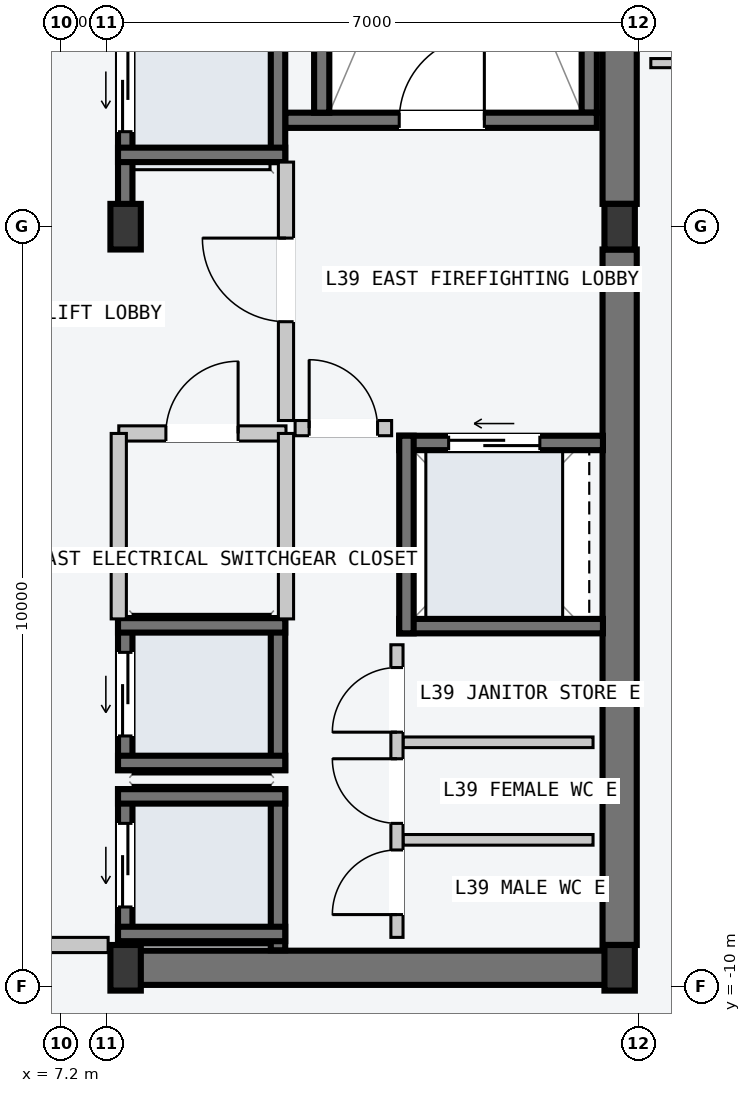
"""IFC4 building model, lengths in metres.
Left out: names, types, materials, properties, quantities, classifications, styles, units other than length and angle.
Written with IfcOpenShell. Run it as: python <this file> out.ifc"""

import sys

from ifc_helpers import new_model, si_unit, direction, frame, frame_2d, origin, origin_2d, place, context, subcontext, project, spatial, rectangle, i_section, extrude, element, fill, save


model = new_model("IFC4")
c1 = context("Model", 3, precision=1e-05, world=origin(), true_north=direction((0.0, 1.0)))
c2 = subcontext(c1, "Body", "Model", "MODEL_VIEW")
j1 = project(units=[si_unit("LENGTHUNIT", "METRE"), si_unit("PLANEANGLEUNIT", "RADIAN")], contexts=[c1])
p1 = place(None, origin())
s1 = spatial("IfcSite", under=j1, at=p1, CompositionType="ELEMENT")
p2 = place(p1, origin())
s2 = spatial("IfcBuilding", under=s1, at=p2, CompositionType="ELEMENT")
p3 = place(p2, frame((0.0, 0.0, 150.6)))
s3 = spatial("IfcBuildingStorey", under=s2, at=p3, CompositionType="ELEMENT", Elevation=150.6)
p4 = place(p3, frame((8.07, -9.75, -0.2), z_axis=(0.0, 0.0, 1.0), x_axis=(1.0, 0.0, 0.0)))
e1 = element("IfcWall", 1, at=p4, inside=s3, PredefinedType="SHEAR", context=c2, shape_type="SweptSolid", body=[
    extrude(rectangle(XDim=6.46, YDim=0.45, at=frame_2d((3.23, 0.0))), origin(), (0.0, 0.0, 1.0), 4.5),
])
for number, where, z_axis, x_axis in (
    (2, (14.55, -9.45, -0.2), (0.0, 0.0, 1.0), (0.0, 1.0, 0.0)),
    (3, (14.55, 0.3, -0.2), (0.0, 0.0, 1.0), (0.0, 1.0, 0.0)),
):
    element("IfcWall", number, at=place(p3, frame(where, z_axis=z_axis, x_axis=x_axis)), inside=s3, PredefinedType="SHEAR", context=c2, shape_type="SweptSolid", body=[
        extrude(rectangle(XDim=9.15, YDim=0.45, at=frame_2d((4.575, 0.0))), origin(), (0.0, 0.0, 1.0), 4.5),
    ])
p5 = place(p3, frame((14.15, 1.5, -0.2), z_axis=(0.0, 0.0, 1.0), x_axis=(0.0, 1.0, 0.0)))
e4 = element("IfcWall", 4, at=p5, inside=s3, PredefinedType="SOLIDWALL", context=c2, shape_type="SweptSolid", body=[
    extrude(rectangle(XDim=7.8, YDim=0.2, at=frame_2d((3.9, 0.0))), origin(), (0.0, 0.0, 1.0), 4.5),
])
p6 = place(p3, frame((10.15, 1.4, -0.2), z_axis=(0.0, 0.0, 1.0), x_axis=(1.0, 0.0, 0.0)))
e5 = element("IfcWall", 5, at=p6, inside=s3, PredefinedType="SOLIDWALL", context=c2, shape_type="SweptSolid", body=[
    extrude(rectangle(XDim=4.1, YDim=0.2, at=frame_2d((2.05, 0.0))), origin(), (0.0, 0.0, 1.0), 4.5),
])
p7 = place(p6, frame((1.5, 0.0, 0.2)))
e6 = element("IfcOpeningElement", 6, at=p7, cuts=e5, PredefinedType="OPENING", context=c2, shape_type="SweptSolid", body=[
    extrude(rectangle(XDim=1.12, YDim=2.18, at=frame_2d((0.56, 1.09))), frame((0.0, 0.11, 0.0), z_axis=(0.0, -1.0, 0.0), x_axis=(1.0, 0.0, 0.0)), (0.0, 0.0, 1.0), 0.22),
])
p8 = place(p3, frame((10.63, 1.5, -0.2), z_axis=(0.0, 0.0, 1.0), x_axis=(0.0, 1.0, 0.0)))
e7 = element("IfcWall", 7, at=p8, inside=s3, PredefinedType="SOLIDWALL", context=c2, shape_type="SweptSolid", body=[
    extrude(rectangle(XDim=7.8, YDim=0.2, at=frame_2d((3.9, 0.0))), origin(), (0.0, 0.0, 1.0), 4.5),
])
for number, where, z_axis, x_axis in (
    (8, (8.05, -9.75, 0.0), (0.0, 0.0, 1.0), (1.0, 0.0, 0.0)),
    (9, (8.05, 0.0, 0.0), (0.0, 0.0, 1.0), (1.0, 0.0, 0.0)),
    (10, (14.55, -9.75, 0.0), (0.0, 0.0, 1.0), (1.0, 0.0, 0.0)),
    (11, (14.55, 0.0, 0.0), (0.0, 0.0, 1.0), (1.0, 0.0, 0.0)),
):
    element("IfcColumn", number, at=place(p3, frame(where, z_axis=z_axis, x_axis=x_axis)), inside=s3, PredefinedType="COLUMN", context=c2, shape_type="SweptSolid", body=[
        extrude(i_section(OverallWidth=0.4, OverallDepth=0.6, WebThickness=0.022, FlangeThickness=0.036, at=origin_2d()), origin(), (0.0, 0.0, 1.0), 4.5),
    ])
p9 = place(p3, frame((8.045, 0.21, -0.2), z_axis=(0.0, 0.0, 1.0), x_axis=(0.0, 1.0, 0.0)))
e12 = element("IfcWall", 12, at=p9, inside=s3, PredefinedType="SOLIDWALL", context=c2, shape_type="SweptSolid", body=[
    extrude(rectangle(XDim=2.54, YDim=0.19, at=frame_2d((1.27, 0.0))), origin(), (0.0, 0.0, 1.0), 4.5),
])
p10 = place(p9, frame((1.04, 0.0, 0.2)))
e13 = element("IfcOpeningElement", 13, at=p10, cuts=e12, PredefinedType="OPENING", context=c2, shape_type="SweptSolid", body=[
    extrude(rectangle(XDim=1.1, YDim=2.2, at=frame_2d((0.55, 1.1))), frame((0.0, 0.105, 0.0), z_axis=(0.0, -1.0, 0.0), x_axis=(1.0, 0.0, 0.0)), (0.0, 0.0, 1.0), 0.21),
])
p11 = place(p3, frame((10.055, 0.85, -0.2), z_axis=(0.0, 0.0, 1.0), x_axis=(0.0, 1.0, 0.0)))
e14 = element("IfcWall", 14, at=p11, inside=s3, PredefinedType="SOLIDWALL", context=c2, shape_type="SweptSolid", body=[
    extrude(rectangle(XDim=1.9, YDim=0.19, at=frame_2d((0.95, 0.0))), origin(), (0.0, 0.0, 1.0), 4.5),
])
p12 = place(p3, frame((7.95, 0.945, -0.2), z_axis=(0.0, 0.0, 1.0), x_axis=(1.0, 0.0, 0.0)))
e15 = element("IfcWall", 15, at=p12, inside=s3, PredefinedType="SOLIDWALL", context=c2, shape_type="SweptSolid", body=[
    extrude(rectangle(XDim=2.2, YDim=0.19, at=frame_2d((1.1, 0.0))), origin(), (0.0, 0.0, 1.0), 4.5),
])
p13 = place(p3, frame((8.045, -9.52, -0.2), z_axis=(0.0, 0.0, 1.0), x_axis=(0.0, 1.0, 0.0)))
e16 = element("IfcWall", 16, at=p13, inside=s3, PredefinedType="SOLIDWALL", context=c2, shape_type="SweptSolid", body=[
    extrude(rectangle(XDim=2.12, YDim=0.19, at=frame_2d((1.06, 0.0))), origin(), (0.0, 0.0, 1.0), 4.5),
])
p14 = place(p13, frame((0.57, 0.0, 0.2)))
e17 = element("IfcOpeningElement", 17, at=p14, cuts=e16, PredefinedType="OPENING", context=c2, shape_type="SweptSolid", body=[
    extrude(rectangle(XDim=1.1, YDim=2.2, at=frame_2d((0.55, 1.1))), frame((0.0, 0.105, 0.0), z_axis=(0.0, -1.0, 0.0), x_axis=(1.0, 0.0, 0.0)), (0.0, 0.0, 1.0), 0.21),
])
p15 = place(p3, frame((10.055, -9.52, -0.2), z_axis=(0.0, 0.0, 1.0), x_axis=(0.0, 1.0, 0.0)))
e18 = element("IfcWall", 18, at=p15, inside=s3, PredefinedType="SOLIDWALL", context=c2, shape_type="SweptSolid", body=[
    extrude(rectangle(XDim=2.12, YDim=0.19, at=frame_2d((1.06, 0.0))), origin(), (0.0, 0.0, 1.0), 4.5),
])
for number, where, z_axis, x_axis in (
    (19, (7.95, -7.495, -0.2), (0.0, 0.0, 1.0), (1.0, 0.0, 0.0)),
    (20, (7.95, -9.305, -0.2), (0.0, 0.0, 1.0), (1.0, 0.0, 0.0)),
):
    element("IfcWall", number, at=place(p3, frame(where, z_axis=z_axis, x_axis=x_axis)), inside=s3, PredefinedType="SOLIDWALL", context=c2, shape_type="SweptSolid", body=[
        extrude(rectangle(XDim=2.2, YDim=0.19, at=frame_2d((1.1, 0.0))), origin(), (0.0, 0.0, 1.0), 4.5),
    ])
p16 = place(p3, frame((8.045, -7.15, -0.2), z_axis=(0.0, 0.0, 1.0), x_axis=(0.0, 1.0, 0.0)))
e21 = element("IfcWall", 21, at=p16, inside=s3, PredefinedType="SOLIDWALL", context=c2, shape_type="SweptSolid", body=[
    extrude(rectangle(XDim=2.0, YDim=0.19, at=frame_2d((1.0, 0.0))), origin(), (0.0, 0.0, 1.0), 4.5),
])
p17 = place(p16, frame((0.45, 0.0, 0.2)))
e22 = element("IfcOpeningElement", 22, at=p17, cuts=e21, PredefinedType="OPENING", context=c2, shape_type="SweptSolid", body=[
    extrude(rectangle(XDim=1.1, YDim=2.2, at=frame_2d((0.55, 1.1))), frame((0.0, 0.105, 0.0), z_axis=(0.0, -1.0, 0.0), x_axis=(1.0, 0.0, 0.0)), (0.0, 0.0, 1.0), 0.21),
])
p18 = place(p3, frame((10.055, -7.15, -0.2), z_axis=(0.0, 0.0, 1.0), x_axis=(0.0, 1.0, 0.0)))
e23 = element("IfcWall", 23, at=p18, inside=s3, PredefinedType="SOLIDWALL", context=c2, shape_type="SweptSolid", body=[
    extrude(rectangle(XDim=2.0, YDim=0.19, at=frame_2d((1.0, 0.0))), origin(), (0.0, 0.0, 1.0), 4.5),
])
for number, where, z_axis, x_axis in (
    (24, (7.95, -5.245, -0.2), (0.0, 0.0, 1.0), (1.0, 0.0, 0.0)),
    (25, (7.95, -7.055, -0.2), (0.0, 0.0, 1.0), (1.0, 0.0, 0.0)),
):
    element("IfcWall", number, at=place(p3, frame(where, z_axis=z_axis, x_axis=x_axis)), inside=s3, PredefinedType="SOLIDWALL", context=c2, shape_type="SweptSolid", body=[
        extrude(rectangle(XDim=2.2, YDim=0.19, at=frame_2d((1.1, 0.0))), origin(), (0.0, 0.0, 1.0), 4.5),
    ])
p19 = place(p3, frame((11.65, -2.845, -0.2), z_axis=(0.0, 0.0, 1.0), x_axis=(1.0, 0.0, 0.0)))
e26 = element("IfcWall", 26, at=p19, inside=s3, PredefinedType="SOLIDWALL", context=c2, shape_type="SweptSolid", body=[
    extrude(rectangle(XDim=2.68, YDim=0.19, at=frame_2d((1.34, 0.0))), origin(), (0.0, 0.0, 1.0), 4.5),
])
p20 = place(p19, frame((0.65, 0.0, 0.2)))
e27 = element("IfcOpeningElement", 27, at=p20, cuts=e26, PredefinedType="OPENING", context=c2, shape_type="SweptSolid", body=[
    extrude(rectangle(XDim=1.2, YDim=2.2, at=frame_2d((0.6, 1.1))), frame((0.0, 0.105, 0.0), z_axis=(0.0, -1.0, 0.0), x_axis=(1.0, 0.0, 0.0)), (0.0, 0.0, 1.0), 0.21),
])
p21 = place(p3, frame((11.65, -5.255, -0.2), z_axis=(0.0, 0.0, 1.0), x_axis=(1.0, 0.0, 0.0)))
e28 = element("IfcWall", 28, at=p21, inside=s3, PredefinedType="SOLIDWALL", context=c2, shape_type="SweptSolid", body=[
    extrude(rectangle(XDim=2.68, YDim=0.19, at=frame_2d((1.34, 0.0))), origin(), (0.0, 0.0, 1.0), 4.5),
])
p22 = place(p3, frame((11.745, -5.35, -0.2), z_axis=(0.0, 0.0, 1.0), x_axis=(0.0, 1.0, 0.0)))
e29 = element("IfcWall", 29, at=p22, inside=s3, PredefinedType="SOLIDWALL", context=c2, shape_type="SweptSolid", body=[
    extrude(rectangle(XDim=2.6, YDim=0.19, at=frame_2d((1.3, 0.0))), origin(), (0.0, 0.0, 1.0), 4.5),
])
p23 = place(p3, frame((6.02, -9.45, 0.0), z_axis=(0.0, 0.0, 1.0), x_axis=(1.0, 0.0, 0.0)))
e30 = element("IfcWall", 30, at=p23, inside=s3, PredefinedType="PARTITIONING", context=c2, shape_type="SweptSolid", body=[
    extrude(rectangle(XDim=1.8, YDim=0.2, at=frame_2d((0.9, 0.0))), origin(), (0.0, 0.0, 1.0), 4.3),
])
p24 = place(p3, frame((10.16, -2.55, 0.0), z_axis=(0.0, 0.0, 1.0), x_axis=(0.0, 1.0, 0.0)))
e31 = element("IfcWall", 31, at=p24, inside=s3, PredefinedType="PARTITIONING", context=c2, shape_type="SweptSolid", body=[
    extrude(rectangle(XDim=3.4, YDim=0.2, at=frame_2d((1.7, 0.0))), origin(), (0.0, 0.0, 1.0), 4.3),
])
p25 = place(p24, frame((1.3, 0.0, 0.0)))
e32 = element("IfcOpeningElement", 32, at=p25, cuts=e31, PredefinedType="OPENING", context=c2, shape_type="SweptSolid", body=[
    extrude(rectangle(XDim=1.1, YDim=2.15, at=frame_2d((0.55, 1.075))), frame((0.0, 0.11, 0.0), z_axis=(0.0, -1.0, 0.0), x_axis=(1.0, 0.0, 0.0)), (0.0, 0.0, 1.0), 0.22),
])
p26 = place(p3, frame((10.28, -2.65, 0.0), z_axis=(0.0, 0.0, 1.0), x_axis=(1.0, 0.0, 0.0)))
e33 = element("IfcWall", 33, at=p26, inside=s3, PredefinedType="PARTITIONING", context=c2, shape_type="SweptSolid", body=[
    extrude(rectangle(XDim=1.27, YDim=0.2, at=frame_2d((0.635, 0.0))), origin(), (0.0, 0.0, 1.0), 4.3),
])
p27 = place(p26, frame((0.185, 0.0, 0.0)))
e34 = element("IfcOpeningElement", 34, at=p27, cuts=e33, PredefinedType="OPENING", context=c2, shape_type="SweptSolid", body=[
    extrude(rectangle(XDim=0.9, YDim=2.15, at=frame_2d((0.45, 1.075))), frame((0.0, 0.11, 0.0), z_axis=(0.0, -1.0, 0.0), x_axis=(1.0, 0.0, 0.0)), (0.0, 0.0, 1.0), 0.22),
])
p28 = place(p3, frame((7.96, -2.72, 0.0), z_axis=(0.0, 0.0, 1.0), x_axis=(1.0, 0.0, 0.0)))
e35 = element("IfcWall", 35, at=p28, inside=s3, PredefinedType="PARTITIONING", context=c2, shape_type="SweptSolid", body=[
    extrude(rectangle(XDim=2.2, YDim=0.2, at=frame_2d((1.1, 0.0))), origin(), (0.0, 0.0, 1.0), 4.3),
])
p29 = place(p28, frame((0.62, 0.0, 0.0)))
e36 = element("IfcOpeningElement", 36, at=p29, cuts=e35, PredefinedType="OPENING", context=c2, shape_type="SweptSolid", body=[
    extrude(rectangle(XDim=0.95, YDim=2.1, at=frame_2d((0.475, 1.05))), frame((0.0, 0.11, 0.0), z_axis=(0.0, -1.0, 0.0), x_axis=(1.0, 0.0, 0.0)), (0.0, 0.0, 1.0), 0.22),
])
for number, where, z_axis, x_axis in (
    (37, (7.96, -5.16, 0.0), (0.0, 0.0, 1.0), (0.0, 1.0, 0.0)),
    (38, (10.16, -5.16, 0.0), (0.0, 0.0, 1.0), (0.0, 1.0, 0.0)),
):
    element("IfcWall", number, at=place(p3, frame(where, z_axis=z_axis, x_axis=x_axis)), inside=s3, PredefinedType="PARTITIONING", context=c2, shape_type="SweptSolid", body=[
        extrude(rectangle(XDim=2.44, YDim=0.2, at=frame_2d((1.22, 0.0))), origin(), (0.0, 0.0, 1.0), 4.3),
    ])
for number, where, z_axis, x_axis in (
    (39, (11.7, -8.067, 0.0), (0.0, 0.0, 1.0), (1.0, 0.0, 0.0)),
    (40, (11.7, -6.783, 0.0), (0.0, 0.0, 1.0), (1.0, 0.0, 0.0)),
):
    element("IfcWall", number, at=place(p3, frame(where, z_axis=z_axis, x_axis=x_axis)), inside=s3, PredefinedType="PARTITIONING", context=c2, shape_type="SweptSolid", body=[
        extrude(rectangle(XDim=2.5, YDim=0.14, at=frame_2d((1.25, 0.0))), origin(), (0.0, 0.0, 1.0), 4.3),
    ])
p30 = place(p3, frame((11.62, -9.35, 0.0), z_axis=(0.0, 0.0, 1.0), x_axis=(0.0, 1.0, 0.0)))
e41 = element("IfcWall", 41, at=p30, inside=s3, PredefinedType="PARTITIONING", context=c2, shape_type="SweptSolid", body=[
    extrude(rectangle(XDim=3.85, YDim=0.16, at=frame_2d((1.925, 0.0))), origin(), (0.0, 0.0, 1.0), 4.3),
])
p31 = place(p30, frame((0.3, 0.0, 0.0)))
e42 = element("IfcOpeningElement", 42, at=p31, cuts=e41, PredefinedType="OPENING", context=c2, shape_type="SweptSolid", body=[
    extrude(rectangle(XDim=0.85, YDim=2.12, at=frame_2d((0.425, 1.06))), frame((0.0, 0.09, 0.0), z_axis=(0.0, -1.0, 0.0), x_axis=(1.0, 0.0, 0.0)), (0.0, 0.0, 1.0), 0.18),
])
p32 = place(p30, frame((1.5, 0.0, 0.0)))
e43 = element("IfcOpeningElement", 43, at=p32, cuts=e41, PredefinedType="OPENING", context=c2, shape_type="SweptSolid", body=[
    extrude(rectangle(XDim=0.85, YDim=2.12, at=frame_2d((0.425, 1.06))), frame((0.0, 0.09, 0.0), z_axis=(0.0, -1.0, 0.0), x_axis=(1.0, 0.0, 0.0)), (0.0, 0.0, 1.0), 0.18),
])
p33 = place(p30, frame((2.7, 0.0, 0.0)))
e44 = element("IfcOpeningElement", 44, at=p33, cuts=e41, PredefinedType="OPENING", context=c2, shape_type="SweptSolid", body=[
    extrude(rectangle(XDim=0.85, YDim=2.12, at=frame_2d((0.425, 1.06))), frame((0.0, 0.09, 0.0), z_axis=(0.0, -1.0, 0.0), x_axis=(1.0, 0.0, 0.0)), (0.0, 0.0, 1.0), 0.18),
])
p34 = place(p3, frame((14.96, 2.152, 0.0), z_axis=(0.0, 0.0, 1.0), x_axis=(1.0, 0.0, 0.0)))
e45 = element("IfcWall", 45, at=p34, inside=s3, PredefinedType="PARTITIONING", context=c2, shape_type="SweptSolid", body=[
    extrude(rectangle(XDim=5.6, YDim=0.12, at=frame_2d((2.8, 0.0))), origin(), (0.0, 0.0, 1.0), 4.3),
])
p35 = place(p34, frame((0.9, 0.0, 0.0)))
e46 = element("IfcOpeningElement", 46, at=p35, cuts=e45, PredefinedType="OPENING", context=c2, shape_type="SweptSolid", body=[
    extrude(rectangle(XDim=0.96, YDim=2.18, at=frame_2d((0.48, 1.09))), frame((0.0, 0.07, 0.0), z_axis=(0.0, -1.0, 0.0), x_axis=(1.0, 0.0, 0.0)), (0.0, 0.0, 1.0), 0.14),
])
p36 = place(p7, origin())
e47 = element("IfcDoor", 47, at=p36, inside=s3, OperationType="SINGLE_SWING_RIGHT", PredefinedType="DOOR", context=c2, shape_type="SweptSolid", body=[
    extrude(rectangle(XDim=1.12, YDim=2.18, at=frame_2d((0.56, 1.09))), frame((0.0, 0.025, 0.0), z_axis=(0.0, -1.0, 0.0), x_axis=(1.0, 0.0, 0.0)), (0.0, 0.0, 1.0), 0.05),
])
fill(e6, e47)
p37 = place(p10, origin())
e48 = element("IfcDoor", 48, at=p37, inside=s3, OperationType="SLIDING_TO_LEFT", PredefinedType="DOOR", context=c2, shape_type="SweptSolid", body=[
    extrude(rectangle(XDim=1.1, YDim=2.2, at=frame_2d((0.55, 1.1))), frame((0.0, 0.025, 0.0), z_axis=(0.0, -1.0, 0.0), x_axis=(1.0, 0.0, 0.0)), (0.0, 0.0, 1.0), 0.05),
])
fill(e13, e48)
p38 = place(p14, origin())
e49 = element("IfcDoor", 49, at=p38, inside=s3, OperationType="SLIDING_TO_LEFT", PredefinedType="DOOR", context=c2, shape_type="SweptSolid", body=[
    extrude(rectangle(XDim=1.1, YDim=2.2, at=frame_2d((0.55, 1.1))), frame((0.0, 0.025, 0.0), z_axis=(0.0, -1.0, 0.0), x_axis=(1.0, 0.0, 0.0)), (0.0, 0.0, 1.0), 0.05),
])
fill(e17, e49)
p39 = place(p17, origin())
e50 = element("IfcDoor", 50, at=p39, inside=s3, OperationType="SLIDING_TO_LEFT", PredefinedType="DOOR", context=c2, shape_type="SweptSolid", body=[
    extrude(rectangle(XDim=1.1, YDim=2.2, at=frame_2d((0.55, 1.1))), frame((0.0, 0.025, 0.0), z_axis=(0.0, -1.0, 0.0), x_axis=(1.0, 0.0, 0.0)), (0.0, 0.0, 1.0), 0.05),
])
fill(e22, e50)
p40 = place(p20, origin())
e51 = element("IfcDoor", 51, at=p40, inside=s3, OperationType="SLIDING_TO_LEFT", PredefinedType="DOOR", context=c2, shape_type="SweptSolid", body=[
    extrude(rectangle(XDim=1.2, YDim=2.2, at=frame_2d((0.6, 1.1))), frame((0.0, 0.025, 0.0), z_axis=(0.0, -1.0, 0.0), x_axis=(1.0, 0.0, 0.0)), (0.0, 0.0, 1.0), 0.05),
])
fill(e27, e51)
p41 = place(p25, origin())
e52 = element("IfcDoor", 52, at=p41, inside=s3, OperationType="SINGLE_SWING_RIGHT", PredefinedType="DOOR", context=c2, shape_type="SweptSolid", body=[
    extrude(rectangle(XDim=1.1, YDim=2.15, at=frame_2d((0.55, 1.075))), frame((0.0, 0.025, 0.0), z_axis=(0.0, -1.0, 0.0), x_axis=(1.0, 0.0, 0.0)), (0.0, 0.0, 1.0), 0.05),
])
fill(e32, e52)
p42 = place(p27, origin())
e53 = element("IfcDoor", 53, at=p42, inside=s3, OperationType="SINGLE_SWING_LEFT", PredefinedType="DOOR", context=c2, shape_type="SweptSolid", body=[
    extrude(rectangle(XDim=0.9, YDim=2.15, at=frame_2d((0.45, 1.075))), frame((0.0, 0.025, 0.0), z_axis=(0.0, -1.0, 0.0), x_axis=(1.0, 0.0, 0.0)), (0.0, 0.0, 1.0), 0.05),
])
fill(e34, e53)
p43 = place(p29, origin())
e54 = element("IfcDoor", 54, at=p43, inside=s3, OperationType="SINGLE_SWING_RIGHT", PredefinedType="DOOR", context=c2, shape_type="SweptSolid", body=[
    extrude(rectangle(XDim=0.95, YDim=2.1, at=frame_2d((0.475, 1.05))), frame((0.0, 0.025, 0.0), z_axis=(0.0, -1.0, 0.0), x_axis=(1.0, 0.0, 0.0)), (0.0, 0.0, 1.0), 0.05),
])
fill(e36, e54)
p44 = place(p31, origin())
e55 = element("IfcDoor", 55, at=p44, inside=s3, OperationType="SINGLE_SWING_LEFT", PredefinedType="DOOR", context=c2, shape_type="SweptSolid", body=[
    extrude(rectangle(XDim=0.85, YDim=2.12, at=frame_2d((0.425, 1.06))), frame((0.0, 0.025, 0.0), z_axis=(0.0, -1.0, 0.0), x_axis=(1.0, 0.0, 0.0)), (0.0, 0.0, 1.0), 0.05),
])
fill(e42, e55)
p45 = place(p32, origin())
e56 = element("IfcDoor", 56, at=p45, inside=s3, OperationType="SINGLE_SWING_RIGHT", PredefinedType="DOOR", context=c2, shape_type="SweptSolid", body=[
    extrude(rectangle(XDim=0.85, YDim=2.12, at=frame_2d((0.425, 1.06))), frame((0.0, 0.025, 0.0), z_axis=(0.0, -1.0, 0.0), x_axis=(1.0, 0.0, 0.0)), (0.0, 0.0, 1.0), 0.05),
])
fill(e43, e56)
p46 = place(p33, origin())
e57 = element("IfcDoor", 57, at=p46, inside=s3, OperationType="SINGLE_SWING_LEFT", PredefinedType="DOOR", context=c2, shape_type="SweptSolid", body=[
    extrude(rectangle(XDim=0.85, YDim=2.12, at=frame_2d((0.425, 1.06))), frame((0.0, 0.025, 0.0), z_axis=(0.0, -1.0, 0.0), x_axis=(1.0, 0.0, 0.0)), (0.0, 0.0, 1.0), 0.05),
])
fill(e44, e57)
save(model, sys.argv[1])
